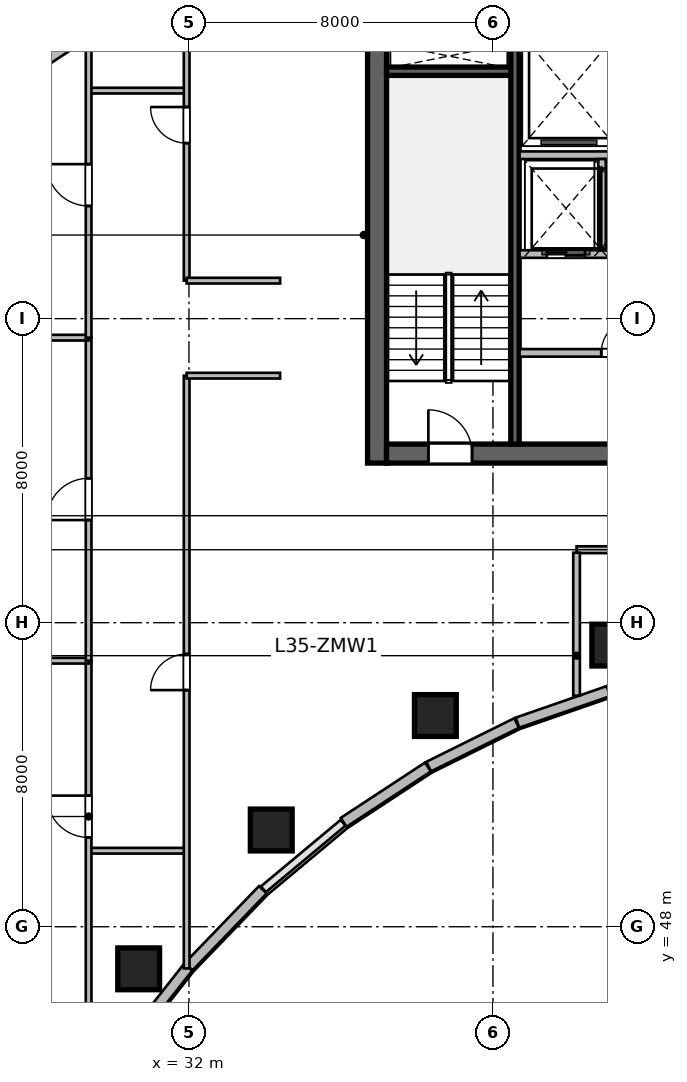
"""IFC4 building model, lengths in metres.
Left out: names, types, materials, properties, quantities, classifications, styles, units other than length and angle.
Written with IfcOpenShell. Run it as: python <this file> out.ifc"""

import sys

from ifc_helpers import new_model, si_unit, direction, frame, frame_2d, origin, origin_2d, place, context, subcontext, project, spatial, rectangle, circle, extrude, source, transform, mapped, element, fill, save


model = new_model("IFC4")
c1 = context("Model", 3, precision=1e-05, world=origin(), true_north=direction((0.0, 1.0)))
c2 = subcontext(c1, "Body", "Model", "MODEL_VIEW")
j1 = project(units=[si_unit("LENGTHUNIT", "METRE"), si_unit("PLANEANGLEUNIT", "RADIAN")], contexts=[c1])
p1 = place(None, origin())
s1 = spatial("IfcSite", under=j1, at=p1, CompositionType="ELEMENT")
p2 = place(p1, origin())
s2 = spatial("IfcBuilding", under=s1, at=p2, CompositionType="ELEMENT")
p3 = place(p2, frame((0.0, 0.0, 146.7)))
s3 = spatial("IfcBuildingStorey", under=s2, at=p3, CompositionType="ELEMENT", Elevation=146.7)
m1 = source(origin(), c2, "Body", "SweptSolid", [
    extrude(rectangle(XDim=12.0, YDim=0.5, at=frame_2d((6.0, 0.0))), origin(), (0.0, 0.0, 1.0), 3.9),
])
p4 = place(p3, frame((36.95, 60.2, 0.0), z_axis=(0.0, 0.0, 1.0), x_axis=(0.0, 1.0, 0.0)))
e1 = element("IfcWall", 1, at=p4, inside=s3, PredefinedType="SHEAR", context=c2, shape_type="MappedRepresentation", body=[
    mapped(m1, transform((0.0, 0.0, 0.0), scale=1.0)),
])
m2 = source(origin(), c2, "Body", "SweptSolid", [
    extrude(rectangle(XDim=21.6, YDim=0.5, at=frame_2d((10.8, 0.0))), origin(), (0.0, 0.0, 1.0), 3.9),
])
p5 = place(p3, frame((37.2, 60.45, 0.0), z_axis=(0.0, 0.0, 1.0), x_axis=(1.0, 0.0, 0.0)))
e2 = element("IfcWall", 2, at=p5, inside=s3, PredefinedType="SHEAR", context=c2, shape_type="MappedRepresentation", body=[
    mapped(m2, transform((0.0, 0.0, 0.0), scale=1.0)),
])
p6 = place(p5, frame((1.1, 0.0, 0.0)))
e3 = element("IfcOpeningElement", 3, at=p6, cuts=e2, PredefinedType="OPENING", context=c2, shape_type="SweptSolid", body=[
    extrude(rectangle(XDim=1.15, YDim=2.15, at=frame_2d((0.575, 1.075))), frame((0.0, 0.26, 0.0), z_axis=(0.0, -1.0, 0.0), x_axis=(1.0, 0.0, 0.0)), (0.0, 0.0, 1.0), 0.52),
])
p7 = place(p5, frame((19.5, 0.0, 0.0)))
e4 = element("IfcOpeningElement", 4, at=p7, cuts=e2, PredefinedType="OPENING", context=c2, shape_type="SweptSolid", body=[
    extrude(rectangle(XDim=0.9, YDim=2.1, at=frame_2d((0.45, 1.05))), frame((0.0, 0.26, 0.0), z_axis=(0.0, -1.0, 0.0), x_axis=(1.0, 0.0, 0.0)), (0.0, 0.0, 1.0), 0.52),
])
p8 = place(p5, frame((12.02, 0.0, 0.0)))
e5 = element("IfcOpeningElement", 5, at=p8, cuts=e2, PredefinedType="OPENING", context=c2, shape_type="SweptSolid", body=[
    extrude(rectangle(XDim=1.6, YDim=2.15, at=frame_2d((0.8, 1.075))), frame((0.0, 0.26, 0.0), z_axis=(0.0, -1.0, 0.0), x_axis=(1.0, 0.0, 0.0)), (0.0, 0.0, 1.0), 0.52),
])
m3 = source(origin(), c2, "Body", "SweptSolid", [
    extrude(rectangle(XDim=3.27, YDim=0.22, at=frame_2d((1.635, 0.0))), origin(), (0.0, 0.0, 1.0), 3.9),
])
p9 = place(p3, frame((37.2, 70.51, 0.0), z_axis=(0.0, 0.0, 1.0), x_axis=(1.0, 0.0, 0.0)))
e6 = element("IfcWall", 6, at=p9, inside=s3, PredefinedType="SHEAR", context=c2, shape_type="MappedRepresentation", body=[
    mapped(m3, transform((0.0, 0.0, 0.0), scale=1.0)),
])
m4 = source(origin(), c2, "Body", "SweptSolid", [
    extrude(rectangle(XDim=11.0, YDim=0.22, at=frame_2d((5.5, 0.0))), origin(), (0.0, 0.0, 1.0), 3.9),
])
p10 = place(p3, frame((40.58, 60.7, 0.0), z_axis=(0.0, 0.0, 1.0), x_axis=(0.0, 1.0, 0.0)))
e7 = element("IfcWall", 7, at=p10, inside=s3, PredefinedType="SHEAR", context=c2, shape_type="MappedRepresentation", body=[
    mapped(m4, transform((0.0, 0.0, 0.0), scale=1.0)),
])
m5 = source(origin(), c2, "Body", "SweptSolid", [
    extrude(circle(Radius=0.55, at=origin_2d()), origin(), (0.0, 0.0, 1.0), 3.9),
])
for number, where, z_axis, x_axis in (
    (8, (30.677, 46.892, 0.0), (0.0, 0.0, 1.0), (-0.571, 0.821, 0.0)),
    (9, (34.166, 50.545, 0.0), (0.0, 0.0, 1.0), (-0.436, 0.9, 0.0)),
    (10, (38.485, 53.558, 0.0), (0.0, 0.0, 1.0), (-0.289, 0.957, 0.0)),
    (11, (43.154, 55.411, 0.0), (0.0, 0.0, 1.0), (-0.143, 0.99, 0.0)),
):
    element("IfcColumn", number, at=place(p3, frame(where, z_axis=z_axis, x_axis=x_axis)), inside=s3, PredefinedType="COLUMN", context=c2, shape_type="MappedRepresentation", body=[
        mapped(m5, transform((0.0, 0.0, 0.0), scale=1.0)),
    ])
m6 = source(origin(), c2, "Body", "SweptSolid", [
    extrude(rectangle(XDim=2.53, YDim=0.28, at=frame_2d((1.265, 0.0))), origin(), (0.0, 0.0, 1.0), 3.65),
])
p11 = place(p3, frame((43.035, 54.198, 0.0), z_axis=(0.0, 0.0, 1.0), x_axis=(-0.944872429646, -0.327438683872, 0.0)))
e12 = element("IfcWall", 12, at=p11, inside=s3, PredefinedType="SOLIDWALL", context=c2, shape_type="MappedRepresentation", body=[
    mapped(m6, transform((0.0, 0.0, 0.0), scale=1.0)),
])
m7 = source(origin(), c2, "Body", "SweptSolid", [
    extrude(rectangle(XDim=2.584, YDim=0.28, at=frame_2d((1.292, 0.0))), origin(), (0.0, 0.0, 1.0), 3.65),
])
p12 = place(p3, frame((40.624, 53.361, 0.0), z_axis=(0.0, 0.0, 1.0), x_axis=(-0.895989792847, -0.44407464588, 0.0)))
e13 = element("IfcWall", 13, at=p12, inside=s3, PredefinedType="SOLIDWALL", context=c2, shape_type="MappedRepresentation", body=[
    mapped(m7, transform((0.0, 0.0, 0.0), scale=1.0)),
])
m8 = source(origin(), c2, "Body", "SweptSolid", [
    extrude(rectangle(XDim=2.652, YDim=0.28, at=frame_2d((1.326, 0.0))), origin(), (0.0, 0.0, 1.0), 3.65),
])
p13 = place(p3, frame((38.289, 52.202, 0.0), z_axis=(0.0, 0.0, 1.0), x_axis=(-0.836008323535, -0.54871676025, 0.0)))
e14 = element("IfcWall", 14, at=p13, inside=s3, PredefinedType="SOLIDWALL", context=c2, shape_type="MappedRepresentation", body=[
    mapped(m8, transform((0.0, 0.0, 0.0), scale=1.0)),
])
m9 = source(origin(), c2, "Body", "SweptSolid", [
    extrude(rectangle(XDim=2.812, YDim=0.28, at=frame_2d((1.406, 0.0))), origin(), (0.0, 0.0, 1.0), 3.65),
])
p14 = place(p3, frame((33.945, 48.973, 0.0), z_axis=(0.0, 0.0, 1.0), x_axis=(-0.694583668785, -0.719411931411, 0.0)))
e15 = element("IfcWall", 15, at=p14, inside=s3, PredefinedType="SOLIDWALL", context=c2, shape_type="MappedRepresentation", body=[
    mapped(m9, transform((0.0, 0.0, 0.0), scale=1.0)),
])
m10 = source(origin(), c2, "Body", "SweptSolid", [
    extrude(rectangle(XDim=2.897, YDim=0.28, at=frame_2d((1.448, 0.0))), origin(), (0.0, 0.0, 1.0), 3.65),
])
p15 = place(p3, frame((31.979, 46.936, 0.0), z_axis=(0.0, 0.0, 1.0), x_axis=(-0.618167636915, -0.786046291685, 0.0)))
e16 = element("IfcWall", 16, at=p15, inside=s3, PredefinedType="SOLIDWALL", context=c2, shape_type="MappedRepresentation", body=[
    mapped(m10, transform((0.0, 0.0, 0.0), scale=1.0)),
])
m11 = source(origin(), c2, "Body", "SweptSolid", [
    extrude(rectangle(XDim=4.501, YDim=0.28, at=frame_2d((2.25, 0.0))), origin(), (0.0, 0.0, 1.0), 3.65),
])
p16 = place(p3, frame((27.939, 70.61, 0.0), z_axis=(0.0, 0.0, 1.0), x_axis=(0.835984920737, 0.548752414391, 0.0)))
e17 = element("IfcWall", 17, at=p16, inside=s3, PredefinedType="SOLIDWALL", context=c2, shape_type="MappedRepresentation", body=[
    mapped(m11, transform((0.0, 0.0, 0.0), scale=1.0)),
])
m12 = source(origin(), c2, "Body", "SweptSolid", [
    extrude(rectangle(XDim=8.8, YDim=0.2, at=frame_2d((4.4, 0.0))), origin(), (0.0, 0.0, 1.0), 3.65),
])
p17 = place(p3, frame((40.7, 68.3, 0.0), z_axis=(0.0, 0.0, 1.0), x_axis=(1.0, 0.0, 0.0)))
e18 = element("IfcWall", 18, at=p17, inside=s3, PredefinedType="SOLIDWALL", context=c2, shape_type="MappedRepresentation", body=[
    mapped(m12, transform((0.0, 0.0, 0.0), scale=1.0)),
])
m13 = source(origin(), c2, "Body", "SweptSolid", [
    extrude(rectangle(XDim=8.02, YDim=0.2, at=frame_2d((4.01, 0.0))), origin(), (0.0, 0.0, 1.0), 3.65),
])
p18 = place(p3, frame((40.7, 63.1, 0.0), z_axis=(0.0, 0.0, 1.0), x_axis=(1.0, 0.0, 0.0)))
e19 = element("IfcWall", 19, at=p18, inside=s3, PredefinedType="SOLIDWALL", context=c2, shape_type="MappedRepresentation", body=[
    mapped(m13, transform((0.0, 0.0, 0.0), scale=1.0)),
])
p19 = place(p18, frame((2.15, 0.0, 0.0)))
e20 = element("IfcOpeningElement", 20, at=p19, cuts=e19, PredefinedType="OPENING", context=c2, shape_type="SweptSolid", body=[
    extrude(rectangle(XDim=0.9, YDim=2.1, at=frame_2d((0.45, 1.05))), frame((0.0, 0.11, 0.0), z_axis=(0.0, -1.0, 0.0), x_axis=(1.0, 0.0, 0.0)), (0.0, 0.0, 1.0), 0.22),
])
p20 = place(p18, frame((6.09, 0.0, 0.0)))
e21 = element("IfcOpeningElement", 21, at=p20, cuts=e19, PredefinedType="OPENING", context=c2, shape_type="SweptSolid", body=[
    extrude(rectangle(XDim=0.9, YDim=2.1, at=frame_2d((0.45, 1.05))), frame((0.0, 0.11, 0.0), z_axis=(0.0, -1.0, 0.0), x_axis=(1.0, 0.0, 0.0)), (0.0, 0.0, 1.0), 0.22),
])
p21 = place(p3, frame((40.7, 65.7, 0.0), z_axis=(0.0, 0.0, 1.0), x_axis=(1.0, 0.0, 0.0)))
e22 = element("IfcWall", 22, at=p21, inside=s3, PredefinedType="SOLIDWALL", context=c2, shape_type="MappedRepresentation", body=[
    mapped(m12, transform((0.0, 0.0, 0.0), scale=1.0)),
])
p22 = place(p21, frame((0.72, 0.0, 0.0)))
e23 = element("IfcOpeningElement", 23, at=p22, cuts=e22, PredefinedType="OPENING", context=c2, shape_type="SweptSolid", body=[
    extrude(rectangle(XDim=1.0, YDim=2.15, at=frame_2d((0.5, 1.075))), frame((0.0, 0.11, 0.0), z_axis=(0.0, -1.0, 0.0), x_axis=(1.0, 0.0, 0.0)), (0.0, 0.0, 1.0), 0.22),
])
p23 = place(p21, frame((2.62, 0.0, 0.0)))
e24 = element("IfcOpeningElement", 24, at=p23, cuts=e22, PredefinedType="OPENING", context=c2, shape_type="SweptSolid", body=[
    extrude(rectangle(XDim=1.0, YDim=2.15, at=frame_2d((0.5, 1.075))), frame((0.0, 0.11, 0.0), z_axis=(0.0, -1.0, 0.0), x_axis=(1.0, 0.0, 0.0)), (0.0, 0.0, 1.0), 0.22),
])
p24 = place(p21, frame((4.55, 0.0, 0.0)))
e25 = element("IfcOpeningElement", 25, at=p24, cuts=e22, PredefinedType="OPENING", context=c2, shape_type="SweptSolid", body=[
    extrude(rectangle(XDim=1.0, YDim=2.15, at=frame_2d((0.5, 1.075))), frame((0.0, 0.11, 0.0), z_axis=(0.0, -1.0, 0.0), x_axis=(1.0, 0.0, 0.0)), (0.0, 0.0, 1.0), 0.22),
])
p25 = place(p21, frame((6.55, 0.0, 0.0)))
e26 = element("IfcOpeningElement", 26, at=p25, cuts=e22, PredefinedType="OPENING", context=c2, shape_type="SweptSolid", body=[
    extrude(rectangle(XDim=1.0, YDim=2.15, at=frame_2d((0.5, 1.075))), frame((0.0, 0.11, 0.0), z_axis=(0.0, -1.0, 0.0), x_axis=(1.0, 0.0, 0.0)), (0.0, 0.0, 1.0), 0.22),
])
m14 = source(origin(), c2, "Body", "SweptSolid", [
    extrude(rectangle(XDim=2.4, YDim=0.2, at=frame_2d((1.2, 0.0))), origin(), (0.0, 0.0, 1.0), 3.65),
])
p26 = place(p3, frame((42.87, 65.8, 0.0), z_axis=(0.0, 0.0, 1.0), x_axis=(0.0, 1.0, 0.0)))
e27 = element("IfcWall", 27, at=p26, inside=s3, PredefinedType="SOLIDWALL", context=c2, shape_type="MappedRepresentation", body=[
    mapped(m14, transform((0.0, 0.0, 0.0), scale=1.0)),
])
m15 = source(origin(), c2, "Body", "SweptSolid", [
    extrude(rectangle(XDim=4.176, YDim=0.18, at=frame_2d((2.088, 0.0))), origin(), (0.0, 0.0, 1.0), 3.65),
])
p27 = place(p3, frame((42.2, 57.92, 0.0), z_axis=(0.0, 0.0, 1.0), x_axis=(1.0, 0.0, 0.0)))
e28 = element("IfcWall", 28, at=p27, inside=s3, PredefinedType="PLUMBINGWALL", context=c2, shape_type="MappedRepresentation", body=[
    mapped(m15, transform((0.0, 0.0, 0.0), scale=1.0)),
])
p28 = place(p27, frame((1.638, 0.0, 0.0)))
e29 = element("IfcOpeningElement", 29, at=p28, cuts=e28, PredefinedType="OPENING", context=c2, shape_type="SweptSolid", body=[
    extrude(rectangle(XDim=0.9, YDim=2.08, at=frame_2d((0.45, 1.04))), frame((0.0, 0.1, 0.0), z_axis=(0.0, -1.0, 0.0), x_axis=(1.0, 0.0, 0.0)), (0.0, 0.0, 1.0), 0.2),
])
m16 = source(origin(), c2, "Body", "SweptSolid", [
    extrude(rectangle(XDim=3.763, YDim=0.175, at=frame_2d((1.881, 0.0))), origin(), (0.0, 0.0, 1.0), 3.65),
])
p29 = place(p3, frame((42.2, 54.079, 0.0), z_axis=(0.0, 0.0, 1.0), x_axis=(0.0, 1.0, 0.0)))
e30 = element("IfcWall", 30, at=p29, inside=s3, PredefinedType="PARTITIONING", context=c2, shape_type="MappedRepresentation", body=[
    mapped(m16, transform((0.0, 0.0, 0.0), scale=1.0)),
])
m17 = source(origin(), c2, "Body", "SweptSolid", [
    extrude(rectangle(XDim=2.5, YDim=0.15, at=frame_2d((1.25, 0.0))), origin(), (0.0, 0.0, 1.0), 3.65),
])
for number, where, z_axis, x_axis in (
    (31, (29.4, 50.0, 0.0), (0.0, 0.0, 1.0), (1.0, 0.0, 0.0)),
    (32, (29.4, 70.0, 0.0), (0.0, 0.0, 1.0), (1.0, 0.0, 0.0)),
):
    element("IfcWall", number, at=place(p3, frame(where, z_axis=z_axis, x_axis=x_axis)), inside=s3, PredefinedType="PARTITIONING", context=c2, shape_type="MappedRepresentation", body=[
        mapped(m17, transform((0.0, 0.0, 0.0), scale=1.0)),
    ])
m18 = source(origin(), c2, "Body", "SweptSolid", [
    extrude(rectangle(XDim=11.612, YDim=0.15, at=frame_2d((5.806, 0.0))), origin(), (0.0, 0.0, 1.0), 2.942),
])
p30 = place(p3, frame((29.36, 43.388, 0.0), z_axis=(0.0, 0.0, 1.0), x_axis=(0.0, 1.0, 0.0)))
e33 = element("IfcWall", 33, at=p30, inside=s3, PredefinedType="PARTITIONING", context=c2, shape_type="MappedRepresentation", body=[
    mapped(m18, transform((0.0, 0.0, 0.0), scale=1.0)),
])
p31 = place(p30, frame((6.962, 0.0, 0.0)))
e34 = element("IfcOpeningElement", 34, at=p31, cuts=e33, PredefinedType="OPENING", context=c2, shape_type="SweptSolid", body=[
    extrude(rectangle(XDim=1.1, YDim=2.15, at=frame_2d((0.55, 1.075))), frame((0.0, 0.085, 0.0), z_axis=(0.0, -1.0, 0.0), x_axis=(1.0, 0.0, 0.0)), (0.0, 0.0, 1.0), 0.17),
])
m19 = source(origin(), c2, "Body", "SweptSolid", [
    extrude(rectangle(XDim=14.623, YDim=0.15, at=frame_2d((7.312, 0.0))), origin(), (0.0, 0.0, 1.0), 3.65),
])
p32 = place(p3, frame((14.737, 55.0, 0.0), z_axis=(0.0, 0.0, 1.0), x_axis=(1.0, 0.0, 0.0)))
e35 = element("IfcWall", 35, at=p32, inside=s3, PredefinedType="PARTITIONING", context=c2, shape_type="MappedRepresentation", body=[
    mapped(m19, transform((0.0, 0.0, 0.0), scale=1.0)),
])
m20 = source(origin(), c2, "Body", "SweptSolid", [
    extrude(rectangle(XDim=8.5, YDim=0.15, at=frame_2d((4.25, 0.0))), origin(), (0.0, 0.0, 1.0), 2.942),
])
p33 = place(p3, frame((29.36, 55.0, 0.0), z_axis=(0.0, 0.0, 1.0), x_axis=(0.0, 1.0, 0.0)))
e36 = element("IfcWall", 36, at=p33, inside=s3, PredefinedType="PARTITIONING", context=c2, shape_type="MappedRepresentation", body=[
    mapped(m20, transform((0.0, 0.0, 0.0), scale=1.0)),
])
p34 = place(p33, frame((3.7, 0.0, 0.0)))
e37 = element("IfcOpeningElement", 37, at=p34, cuts=e36, PredefinedType="OPENING", context=c2, shape_type="SweptSolid", body=[
    extrude(rectangle(XDim=1.1, YDim=2.15, at=frame_2d((0.55, 1.075))), frame((0.0, 0.085, 0.0), z_axis=(0.0, -1.0, 0.0), x_axis=(1.0, 0.0, 0.0)), (0.0, 0.0, 1.0), 0.17),
])
m21 = source(origin(), c2, "Body", "SweptSolid", [
    extrude(rectangle(XDim=8.839, YDim=0.15, at=frame_2d((4.419, 0.0))), origin(), (0.0, 0.0, 1.0), 3.65),
])
p35 = place(p3, frame((20.521, 63.5, 0.0), z_axis=(0.0, 0.0, 1.0), x_axis=(1.0, 0.0, 0.0)))
e38 = element("IfcWall", 38, at=p35, inside=s3, PredefinedType="PARTITIONING", context=c2, shape_type="MappedRepresentation", body=[
    mapped(m21, transform((0.0, 0.0, 0.0), scale=1.0)),
])
m22 = source(origin(), c2, "Body", "SweptSolid", [
    extrude(rectangle(XDim=8.031, YDim=0.15, at=frame_2d((4.015, 0.0))), origin(), (0.0, 0.0, 1.0), 3.65),
])
p36 = place(p3, frame((29.36, 63.5, 0.0), z_axis=(0.0, 0.0, 1.0), x_axis=(0.0, 1.0, 0.0)))
e39 = element("IfcWall", 39, at=p36, inside=s3, PredefinedType="PARTITIONING", context=c2, shape_type="MappedRepresentation", body=[
    mapped(m22, transform((0.0, 0.0, 0.0), scale=1.0)),
])
p37 = place(p36, frame((3.465, 0.0, 0.0)))
e40 = element("IfcOpeningElement", 40, at=p37, cuts=e39, PredefinedType="OPENING", context=c2, shape_type="SweptSolid", body=[
    extrude(rectangle(XDim=1.1, YDim=2.15, at=frame_2d((0.55, 1.075))), frame((0.0, 0.085, 0.0), z_axis=(0.0, -1.0, 0.0), x_axis=(1.0, 0.0, 0.0)), (0.0, 0.0, 1.0), 0.17),
])
m23 = source(origin(), c2, "Body", "SweptSolid", [
    extrude(rectangle(XDim=15.598, YDim=0.15, at=frame_2d((7.799, 0.0))), origin(), (0.0, 0.0, 1.0), 2.942),
])
p38 = place(p3, frame((31.94, 46.902, 0.0), z_axis=(0.0, 0.0, 1.0), x_axis=(0.0, 1.0, 0.0)))
e41 = element("IfcWall", 41, at=p38, inside=s3, PredefinedType="PARTITIONING", context=c2, shape_type="MappedRepresentation", body=[
    mapped(m23, transform((0.0, 0.0, 0.0), scale=1.0)),
])
p39 = place(p38, frame((7.324, 0.0, 0.0)))
e42 = element("IfcOpeningElement", 42, at=p39, cuts=e41, PredefinedType="OPENING", context=c2, shape_type="SweptSolid", body=[
    extrude(rectangle(XDim=0.95, YDim=2.1, at=frame_2d((0.475, 1.05))), frame((0.0, 0.085, 0.0), z_axis=(0.0, -1.0, 0.0), x_axis=(1.0, 0.0, 0.0)), (0.0, 0.0, 1.0), 0.17),
])
m24 = source(origin(), c2, "Body", "SweptSolid", [
    extrude(rectangle(XDim=2.46, YDim=0.15, at=frame_2d((1.23, 0.0))), origin(), (0.0, 0.0, 1.0), 3.65),
])
p40 = place(p3, frame((31.94, 62.5, 0.0), z_axis=(0.0, 0.0, 1.0), x_axis=(1.0, 0.0, 0.0)))
e43 = element("IfcWall", 43, at=p40, inside=s3, PredefinedType="PARTITIONING", context=c2, shape_type="MappedRepresentation", body=[
    mapped(m24, transform((0.0, 0.0, 0.0), scale=1.0)),
])
m25 = source(origin(), c2, "Body", "SweptSolid", [
    extrude(rectangle(XDim=8.187, YDim=0.15, at=frame_2d((4.093, 0.0))), origin(), (0.0, 0.0, 1.0), 3.65),
])
p41 = place(p3, frame((31.94, 65.0, 0.0), z_axis=(0.0, 0.0, 1.0), x_axis=(0.0, 1.0, 0.0)))
e44 = element("IfcWall", 44, at=p41, inside=s3, PredefinedType="PARTITIONING", context=c2, shape_type="MappedRepresentation", body=[
    mapped(m25, transform((0.0, 0.0, 0.0), scale=1.0)),
])
p42 = place(p41, frame((3.618, 0.0, 0.0)))
e45 = element("IfcOpeningElement", 45, at=p42, cuts=e44, PredefinedType="OPENING", context=c2, shape_type="SweptSolid", body=[
    extrude(rectangle(XDim=0.95, YDim=2.1, at=frame_2d((0.475, 1.05))), frame((0.0, 0.085, 0.0), z_axis=(0.0, -1.0, 0.0), x_axis=(1.0, 0.0, 0.0)), (0.0, 0.0, 1.0), 0.17),
])
p43 = place(p3, frame((31.94, 65.0, 0.0), z_axis=(0.0, 0.0, 1.0), x_axis=(1.0, 0.0, 0.0)))
e46 = element("IfcWall", 46, at=p43, inside=s3, PredefinedType="PARTITIONING", context=c2, shape_type="MappedRepresentation", body=[
    mapped(m24, transform((0.0, 0.0, 0.0), scale=1.0)),
])
m26 = source(origin(), c2, "Body", "SweptSolid", [
    extrude(rectangle(XDim=1.15, YDim=2.15, at=frame_2d((0.575, 1.075))), frame((0.0, 0.025, 0.0), z_axis=(0.0, -1.0, 0.0), x_axis=(1.0, 0.0, 0.0)), (0.0, 0.0, 1.0), 0.05),
])
p44 = place(p6, origin())
e47 = element("IfcDoor", 47, at=p44, inside=s3, OperationType="SINGLE_SWING_LEFT", PredefinedType="DOOR", context=c2, shape_type="MappedRepresentation", body=[
    mapped(m26, transform((0.0, 0.0, 0.0), scale=1.0)),
])
fill(e3, e47)
m27 = source(origin(), c2, "Body", "SweptSolid", [
    extrude(rectangle(XDim=0.9, YDim=2.1, at=frame_2d((0.45, 1.05))), frame((0.0, 0.025, 0.0), z_axis=(0.0, -1.0, 0.0), x_axis=(1.0, 0.0, 0.0)), (0.0, 0.0, 1.0), 0.05),
])
p45 = place(p19, origin())
e48 = element("IfcDoor", 48, at=p45, inside=s3, OperationType="SINGLE_SWING_RIGHT", PredefinedType="DOOR", context=c2, shape_type="MappedRepresentation", body=[
    mapped(m27, transform((0.0, 0.0, 0.0), scale=1.0)),
])
fill(e20, e48)
m28 = source(origin(), c2, "Body", "SweptSolid", [
    extrude(rectangle(XDim=1.0, YDim=2.15, at=frame_2d((0.5, 1.075))), frame((0.0, 0.025, 0.0), z_axis=(0.0, -1.0, 0.0), x_axis=(1.0, 0.0, 0.0)), (0.0, 0.0, 1.0), 0.05),
])
p46 = place(p22, origin())
e49 = element("IfcDoor", 49, at=p46, inside=s3, OperationType="DOUBLE_DOOR_SLIDING", PredefinedType="DOOR", context=c2, shape_type="MappedRepresentation", body=[
    mapped(m28, transform((0.0, 0.0, 0.0), scale=1.0)),
])
fill(e23, e49)
m29 = source(origin(), c2, "Body", "SweptSolid", [
    extrude(rectangle(XDim=1.1, YDim=2.15, at=frame_2d((0.55, 1.075))), frame((0.0, 0.025, 0.0), z_axis=(0.0, -1.0, 0.0), x_axis=(1.0, 0.0, 0.0)), (0.0, 0.0, 1.0), 0.05),
])
p47 = place(p31, origin())
e50 = element("IfcDoor", 50, at=p47, inside=s3, OperationType="SINGLE_SWING_RIGHT", PredefinedType="DOOR", context=c2, shape_type="MappedRepresentation", body=[
    mapped(m29, transform((0.0, 0.0, 0.0), scale=1.0)),
])
fill(e34, e50)
p48 = place(p34, origin())
e51 = element("IfcDoor", 51, at=p48, inside=s3, OperationType="SINGLE_SWING_LEFT", PredefinedType="DOOR", context=c2, shape_type="MappedRepresentation", body=[
    mapped(m29, transform((0.0, 0.0, 0.0), scale=1.0)),
])
fill(e37, e51)
p49 = place(p37, origin())
e52 = element("IfcDoor", 52, at=p49, inside=s3, OperationType="SINGLE_SWING_RIGHT", PredefinedType="DOOR", context=c2, shape_type="MappedRepresentation", body=[
    mapped(m29, transform((0.0, 0.0, 0.0), scale=1.0)),
])
fill(e40, e52)
m30 = source(origin(), c2, "Body", "SweptSolid", [
    extrude(rectangle(XDim=0.95, YDim=2.1, at=frame_2d((0.475, 1.05))), frame((0.0, 0.025, 0.0), z_axis=(0.0, -1.0, 0.0), x_axis=(1.0, 0.0, 0.0)), (0.0, 0.0, 1.0), 0.05),
])
p50 = place(p39, origin())
e53 = element("IfcDoor", 53, at=p50, inside=s3, OperationType="SINGLE_SWING_LEFT", PredefinedType="DOOR", context=c2, shape_type="MappedRepresentation", body=[
    mapped(m30, transform((0.0, 0.0, 0.0), scale=1.0)),
])
fill(e42, e53)
p51 = place(p42, origin())
e54 = element("IfcDoor", 54, at=p51, inside=s3, OperationType="SINGLE_SWING_RIGHT", PredefinedType="DOOR", context=c2, shape_type="MappedRepresentation", body=[
    mapped(m30, transform((0.0, 0.0, 0.0), scale=1.0)),
])
fill(e45, e54)
save(model, sys.argv[1])
